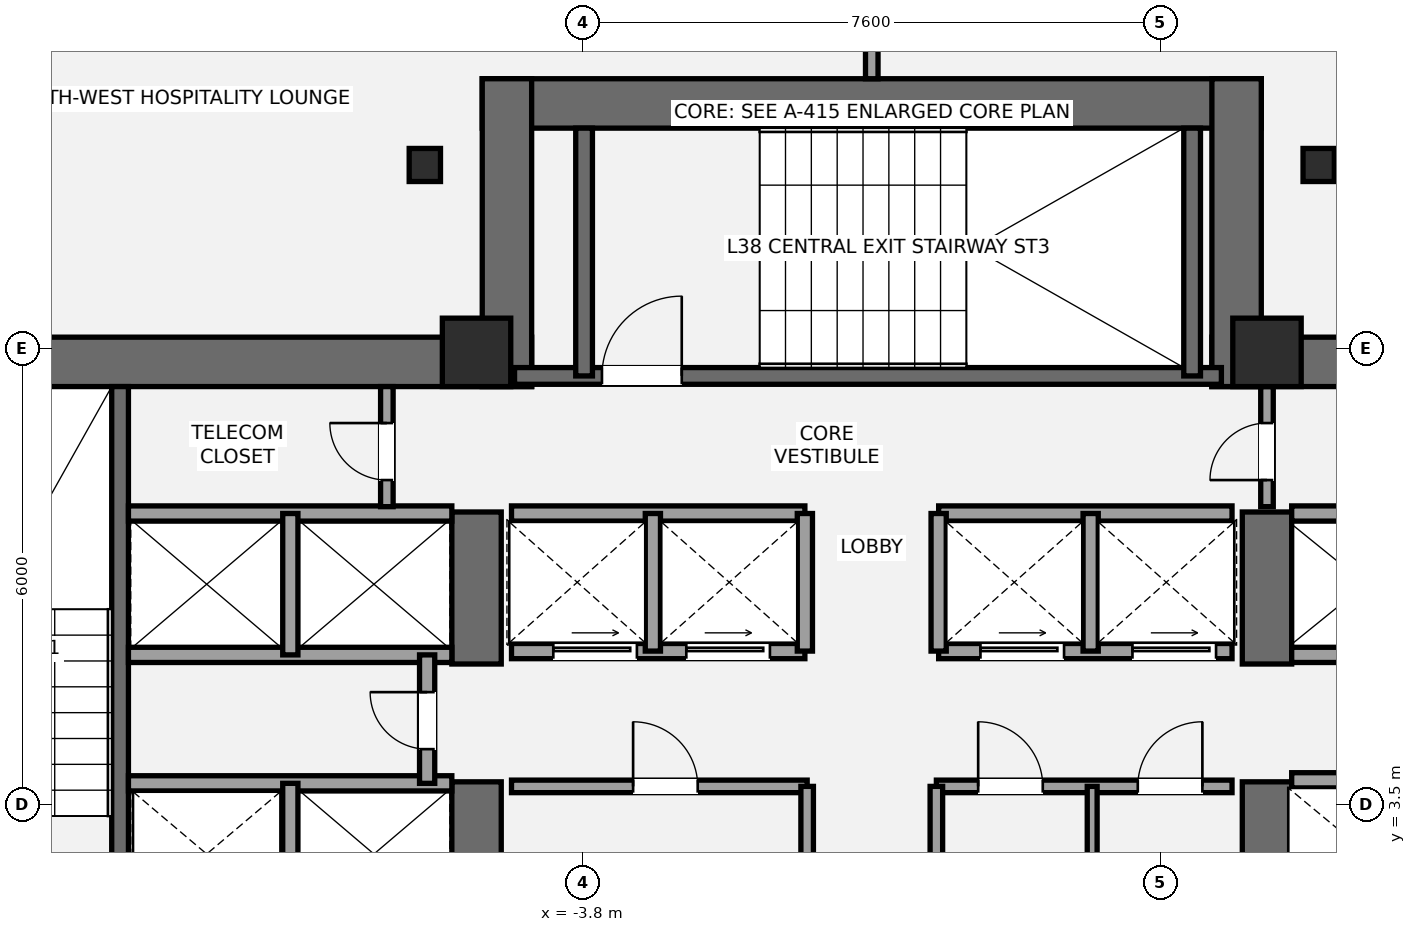
"""IFC4 building model, lengths in metres.
Left out: names, types, materials, properties, quantities, classifications, styles, units other than length and angle.
Written with IfcOpenShell. Run it as: python <this file> out.ifc"""

import sys

from ifc_helpers import new_model, si_unit, direction, frame, frame_2d, origin, origin_2d, place, context, subcontext, project, spatial, rectangle, i_section, extrude, element, fill, save


model = new_model("IFC4")
c1 = context("Model", 3, precision=1e-05, world=origin(), true_north=direction((0.0, 1.0)))
c2 = subcontext(c1, "Body", "Model", "MODEL_VIEW")
j1 = project(units=[si_unit("LENGTHUNIT", "METRE"), si_unit("PLANEANGLEUNIT", "RADIAN")], contexts=[c1])
p1 = place(None, origin())
s1 = spatial("IfcSite", under=j1, at=p1, CompositionType="ELEMENT")
p2 = place(p1, origin())
s2 = spatial("IfcBuilding", under=s1, at=p2, CompositionType="ELEMENT")
p3 = place(p2, frame((0.0, 0.0, 143.8)))
s3 = spatial("IfcBuildingStorey", under=s2, at=p3, CompositionType="ELEMENT", Elevation=143.8)
p4 = place(p3, frame((-13.8, 9.325, 0.0), z_axis=(0.0, 0.0, 1.0), x_axis=(1.0, 0.0, 0.0)))
e1 = element("IfcWall", 1, at=p4, inside=s3, PredefinedType="SHEAR", context=c2, shape_type="SweptSolid", body=[
    extrude(rectangle(XDim=9.325, YDim=0.65, at=frame_2d((4.663, 0.0))), origin(), (0.0, 0.0, 1.0), 3.2),
])
p5 = place(p3, frame((-5.2, 1.2, 0.0), z_axis=(0.0, 0.0, 1.0), x_axis=(0.0, 1.0, 0.0)))
e2 = element("IfcWall", 2, at=p5, inside=s3, PredefinedType="SHEAR", context=c2, shape_type="SweptSolid", body=[
    extrude(rectangle(XDim=2.6, YDim=0.65, at=frame_2d((1.3, 0.0))), origin(), (0.0, 0.0, 1.0), 3.2),
])
p6 = place(p3, frame((-5.2, 5.35, 0.0), z_axis=(0.0, 0.0, 1.0), x_axis=(0.0, 1.0, 0.0)))
e3 = element("IfcWall", 3, at=p6, inside=s3, PredefinedType="SHEAR", context=c2, shape_type="SweptSolid", body=[
    extrude(rectangle(XDim=2.0, YDim=0.65, at=frame_2d((1.0, 0.0))), origin(), (0.0, 0.0, 1.0), 3.2),
])
p7 = place(p3, frame((-9.89, 1.85, 0.0), z_axis=(0.0, 0.0, 1.0), x_axis=(0.0, 1.0, 0.0)))
e4 = element("IfcWall", 4, at=p7, inside=s3, PredefinedType="SHEAR", context=c2, shape_type="SweptSolid", body=[
    extrude(rectangle(XDim=7.15, YDim=0.22, at=frame_2d((3.575, 0.0))), origin(), (0.0, 0.0, 1.0), 3.2),
])
p8 = place(p3, frame((4.475, 9.325, 0.0), z_axis=(0.0, 0.0, 1.0), x_axis=(1.0, 0.0, 0.0)))
e5 = element("IfcWall", 5, at=p8, inside=s3, PredefinedType="SHEAR", context=c2, shape_type="SweptSolid", body=[
    extrude(rectangle(XDim=9.325, YDim=0.65, at=frame_2d((4.663, 0.0))), origin(), (0.0, 0.0, 1.0), 3.2),
])
p9 = place(p3, frame((5.2, 1.2, 0.0), z_axis=(0.0, 0.0, 1.0), x_axis=(0.0, 1.0, 0.0)))
e6 = element("IfcWall", 6, at=p9, inside=s3, PredefinedType="SHEAR", context=c2, shape_type="SweptSolid", body=[
    extrude(rectangle(XDim=2.6, YDim=0.65, at=frame_2d((1.3, 0.0))), origin(), (0.0, 0.0, 1.0), 3.2),
])
p10 = place(p3, frame((5.2, 5.35, 0.0), z_axis=(0.0, 0.0, 1.0), x_axis=(0.0, 1.0, 0.0)))
e7 = element("IfcWall", 7, at=p10, inside=s3, PredefinedType="SHEAR", context=c2, shape_type="SweptSolid", body=[
    extrude(rectangle(XDim=2.0, YDim=0.65, at=frame_2d((1.0, 0.0))), origin(), (0.0, 0.0, 1.0), 3.2),
])
p11 = place(p3, frame((-5.125, 12.725, 0.0), z_axis=(0.0, 0.0, 1.0), x_axis=(1.0, 0.0, 0.0)))
e8 = element("IfcWall", 8, at=p11, inside=s3, PredefinedType="SHEAR", context=c2, shape_type="SweptSolid", body=[
    extrude(rectangle(XDim=10.25, YDim=0.65, at=frame_2d((5.125, 0.0))), origin(), (0.0, 0.0, 1.0), 3.2),
])
for number, where, z_axis, x_axis in (
    (9, (-4.8, 9.0, 0.0), (0.0, 0.0, 1.0), (0.0, 1.0, 0.0)),
    (10, (4.8, 9.0, 0.0), (0.0, 0.0, 1.0), (0.0, 1.0, 0.0)),
):
    element("IfcWall", number, at=place(p3, frame(where, z_axis=z_axis, x_axis=x_axis)), inside=s3, PredefinedType="SHEAR", context=c2, shape_type="SweptSolid", body=[
        extrude(rectangle(XDim=4.05, YDim=0.65, at=frame_2d((2.025, 0.0))), origin(), (0.0, 0.0, 1.0), 3.2),
    ])
p12 = place(p3, frame((-4.7, 9.14, 0.0), z_axis=(0.0, 0.0, 1.0), x_axis=(1.0, 0.0, 0.0)))
e11 = element("IfcWall", 11, at=p12, inside=s3, PredefinedType="SHEAR", context=c2, shape_type="SweptSolid", body=[
    extrude(rectangle(XDim=9.3, YDim=0.22, at=frame_2d((4.65, 0.0))), origin(), (0.0, 0.0, 1.0), 3.2),
])
p13 = place(p12, frame((1.15, 0.0, 0.0)))
e12 = element("IfcOpeningElement", 12, at=p13, cuts=e11, PredefinedType="OPENING", context=c2, shape_type="SweptSolid", body=[
    extrude(rectangle(XDim=1.05, YDim=2.15, at=frame_2d((0.525, 1.075))), frame((0.0, 0.12, 0.0), z_axis=(0.0, -1.0, 0.0), x_axis=(1.0, 0.0, 0.0)), (0.0, 0.0, 1.0), 0.24),
])
for number, where, z_axis, x_axis in (
    (13, (-3.785, 9.14, 0.0), (0.0, 0.0, 1.0), (0.0, 1.0, 0.0)),
    (14, (4.215, 9.14, 0.0), (0.0, 0.0, 1.0), (0.0, 1.0, 0.0)),
):
    element("IfcWall", number, at=place(p3, frame(where, z_axis=z_axis, x_axis=x_axis)), inside=s3, PredefinedType="SHEAR", context=c2, shape_type="SweptSolid", body=[
        extrude(rectangle(XDim=3.26, YDim=0.22, at=frame_2d((1.63, 0.0))), origin(), (0.0, 0.0, 1.0), 3.2),
    ])
for number, where, z_axis, x_axis in (
    (15, (-5.2, 9.45, 0.0), (0.0, 0.0, 1.0), (1.0, 0.0, 0.0)),
    (16, (5.2, 9.45, 0.0), (0.0, 0.0, 1.0), (1.0, 0.0, 0.0)),
):
    element("IfcColumn", number, at=place(p3, frame(where, z_axis=z_axis, x_axis=x_axis)), inside=s3, PredefinedType="COLUMN", context=c2, shape_type="SweptSolid", body=[
        extrude(rectangle(XDim=0.9, YDim=0.9, at=origin_2d()), origin(), (0.0, 0.0, 1.0), 3.2),
    ])
for number, where, z_axis, x_axis in (
    (17, (5.88, 11.915, 0.0), (0.0, 0.0, 1.0), (1.0, 0.0, 0.0)),
    (18, (-5.88, 11.915, 0.0), (0.0, 0.0, 1.0), (1.0, 0.0, 0.0)),
):
    element("IfcColumn", number, at=place(p3, frame(where, z_axis=z_axis, x_axis=x_axis)), inside=s3, PredefinedType="COLUMN", context=c2, shape_type="SweptSolid", body=[
        extrude(i_section(OverallWidth=0.412, OverallDepth=0.435, WebThickness=0.036, FlangeThickness=0.057, at=origin_2d()), origin(), (0.0, 0.0, 1.0), 3.2),
    ])
p14 = place(p3, frame((-9.78, 3.78, 0.0), z_axis=(0.0, 0.0, 1.0), x_axis=(1.0, 0.0, 0.0)))
e19 = element("IfcWall", 19, at=p14, inside=s3, PredefinedType="SOLIDWALL", context=c2, shape_type="SweptSolid", body=[
    extrude(rectangle(XDim=4.255, YDim=0.2, at=frame_2d((2.127, 0.0))), origin(), (0.0, 0.0, 1.0), 3.02),
])
p15 = place(p3, frame((-7.65, 1.85, 0.0), z_axis=(0.0, 0.0, 1.0), x_axis=(0.0, 1.0, 0.0)))
e20 = element("IfcWall", 20, at=p15, inside=s3, PredefinedType="SOLIDWALL", context=c2, shape_type="SweptSolid", body=[
    extrude(rectangle(XDim=1.93, YDim=0.2, at=frame_2d((0.965, 0.0))), origin(), (0.0, 0.0, 1.0), 3.02),
])
for number, where, z_axis, x_axis in (
    (21, (-9.78, 5.47, 0.0), (0.0, 0.0, 1.0), (1.0, 0.0, 0.0)),
    (22, (-9.78, 7.33, 0.0), (0.0, 0.0, 1.0), (1.0, 0.0, 0.0)),
):
    element("IfcWall", number, at=place(p3, frame(where, z_axis=z_axis, x_axis=x_axis)), inside=s3, PredefinedType="SOLIDWALL", context=c2, shape_type="SweptSolid", body=[
        extrude(rectangle(XDim=4.255, YDim=0.2, at=frame_2d((2.127, 0.0))), origin(), (0.0, 0.0, 1.0), 3.02),
    ])
p16 = place(p3, frame((-7.65, 5.47, 0.0), z_axis=(0.0, 0.0, 1.0), x_axis=(0.0, 1.0, 0.0)))
e23 = element("IfcWall", 23, at=p16, inside=s3, PredefinedType="SOLIDWALL", context=c2, shape_type="SweptSolid", body=[
    extrude(rectangle(XDim=1.86, YDim=0.2, at=frame_2d((0.93, 0.0))), origin(), (0.0, 0.0, 1.0), 3.02),
])
p17 = place(p3, frame((-5.85, 3.78, 0.0), z_axis=(0.0, 0.0, 1.0), x_axis=(0.0, 1.0, 0.0)))
e24 = element("IfcWall", 24, at=p17, inside=s3, PredefinedType="SOLIDWALL", context=c2, shape_type="SweptSolid", body=[
    extrude(rectangle(XDim=1.69, YDim=0.2, at=frame_2d((0.845, 0.0))), origin(), (0.0, 0.0, 1.0), 3.02),
])
p18 = place(p17, frame((0.45, 0.0, 0.0)))
e25 = element("IfcOpeningElement", 25, at=p18, cuts=e24, PredefinedType="OPENING", context=c2, shape_type="SweptSolid", body=[
    extrude(rectangle(XDim=0.75, YDim=2.1, at=frame_2d((0.375, 1.05))), frame((0.0, 0.11, 0.0), z_axis=(0.0, -1.0, 0.0), x_axis=(1.0, 0.0, 0.0)), (0.0, 0.0, 1.0), 0.22),
])
p19 = place(p3, frame((5.525, 3.82, 0.0), z_axis=(0.0, 0.0, 1.0), x_axis=(1.0, 0.0, 0.0)))
e26 = element("IfcWall", 26, at=p19, inside=s3, PredefinedType="SOLIDWALL", context=c2, shape_type="SweptSolid", body=[
    extrude(rectangle(XDim=4.255, YDim=0.2, at=frame_2d((2.127, 0.0))), origin(), (0.0, 0.0, 1.0), 3.02),
])
p20 = place(p19, frame((0.65, 0.0, 0.0)))
e27 = element("IfcOpeningElement", 27, at=p20, cuts=e26, PredefinedType="OPENING", context=c2, shape_type="SweptSolid", body=[
    extrude(rectangle(XDim=1.2, YDim=2.2, at=frame_2d((0.6, 1.1))), frame((0.0, 0.11, 0.0), z_axis=(0.0, -1.0, 0.0), x_axis=(1.0, 0.0, 0.0)), (0.0, 0.0, 1.0), 0.22),
])
for number, where, z_axis, x_axis in (
    (28, (5.525, 5.47, 0.0), (0.0, 0.0, 1.0), (1.0, 0.0, 0.0)),
    (29, (5.525, 7.33, 0.0), (0.0, 0.0, 1.0), (1.0, 0.0, 0.0)),
):
    element("IfcWall", number, at=place(p3, frame(where, z_axis=z_axis, x_axis=x_axis)), inside=s3, PredefinedType="SOLIDWALL", context=c2, shape_type="SweptSolid", body=[
        extrude(rectangle(XDim=4.255, YDim=0.2, at=frame_2d((2.127, 0.0))), origin(), (0.0, 0.0, 1.0), 3.02),
    ])
p21 = place(p3, frame((-4.74, 3.74, 0.0), z_axis=(0.0, 0.0, 1.0), x_axis=(1.0, 0.0, 0.0)))
e30 = element("IfcWall", 30, at=p21, inside=s3, PredefinedType="PARTITIONING", context=c2, shape_type="SweptSolid", body=[
    extrude(rectangle(XDim=3.89, YDim=0.165, at=frame_2d((1.945, 0.0))), origin(), (0.0, 0.0, 1.0), 3.02),
])
p22 = place(p21, frame((1.6, 0.0, 0.0)))
e31 = element("IfcOpeningElement", 31, at=p22, cuts=e30, PredefinedType="OPENING", context=c2, shape_type="SweptSolid", body=[
    extrude(rectangle(XDim=0.85, YDim=2.1, at=frame_2d((0.425, 1.05))), frame((0.0, 0.093, 0.0), z_axis=(0.0, -1.0, 0.0), x_axis=(1.0, 0.0, 0.0)), (0.0, 0.0, 1.0), 0.185),
])
p23 = place(p3, frame((-0.85, 1.92, 0.0), z_axis=(0.0, 0.0, 1.0), x_axis=(0.0, 1.0, 0.0)))
e32 = element("IfcWall", 32, at=p23, inside=s3, PredefinedType="PARTITIONING", context=c2, shape_type="SweptSolid", body=[
    extrude(rectangle(XDim=1.82, YDim=0.165, at=frame_2d((0.91, 0.0))), origin(), (0.0, 0.0, 1.0), 3.02),
])
p24 = place(p3, frame((0.85, 3.74, 0.0), z_axis=(0.0, 0.0, 1.0), x_axis=(1.0, 0.0, 0.0)))
e33 = element("IfcWall", 33, at=p24, inside=s3, PredefinedType="PARTITIONING", context=c2, shape_type="SweptSolid", body=[
    extrude(rectangle(XDim=3.89, YDim=0.165, at=frame_2d((1.945, 0.0))), origin(), (0.0, 0.0, 1.0), 3.02),
])
p25 = place(p24, frame((0.55, 0.0, 0.0)))
e34 = element("IfcOpeningElement", 34, at=p25, cuts=e33, PredefinedType="OPENING", context=c2, shape_type="SweptSolid", body=[
    extrude(rectangle(XDim=0.85, YDim=2.1, at=frame_2d((0.425, 1.05))), frame((0.0, 0.093, 0.0), z_axis=(0.0, -1.0, 0.0), x_axis=(1.0, 0.0, 0.0)), (0.0, 0.0, 1.0), 0.185),
])
p26 = place(p24, frame((2.65, 0.0, 0.0)))
e35 = element("IfcOpeningElement", 35, at=p26, cuts=e33, PredefinedType="OPENING", context=c2, shape_type="SweptSolid", body=[
    extrude(rectangle(XDim=0.85, YDim=2.1, at=frame_2d((0.425, 1.05))), frame((0.0, 0.093, 0.0), z_axis=(0.0, -1.0, 0.0), x_axis=(1.0, 0.0, 0.0)), (0.0, 0.0, 1.0), 0.185),
])
p27 = place(p3, frame((0.85, 1.92, 0.0), z_axis=(0.0, 0.0, 1.0), x_axis=(0.0, 1.0, 0.0)))
e36 = element("IfcWall", 36, at=p27, inside=s3, PredefinedType="PARTITIONING", context=c2, shape_type="SweptSolid", body=[
    extrude(rectangle(XDim=1.82, YDim=0.165, at=frame_2d((0.91, 0.0))), origin(), (0.0, 0.0, 1.0), 3.02),
])
p28 = place(p3, frame((2.9, 1.92, 0.0), z_axis=(0.0, 0.0, 1.0), x_axis=(0.0, 1.0, 0.0)))
e37 = element("IfcWall", 37, at=p28, inside=s3, PredefinedType="PARTITIONING", context=c2, shape_type="SweptSolid", body=[
    extrude(rectangle(XDim=1.82, YDim=0.13, at=frame_2d((0.91, 0.0))), origin(), (0.0, 0.0, 1.0), 3.02),
])
p29 = place(p3, frame((-4.74, 5.52, 0.0), z_axis=(0.0, 0.0, 1.0), x_axis=(1.0, 0.0, 0.0)))
e38 = element("IfcWall", 38, at=p29, inside=s3, PredefinedType="SOLIDWALL", context=c2, shape_type="SweptSolid", body=[
    extrude(rectangle(XDim=3.86, YDim=0.2, at=frame_2d((1.93, 0.0))), origin(), (0.0, 0.0, 1.0), 3.02),
])
p30 = place(p29, frame((0.55, 0.0, 0.0)))
e39 = element("IfcOpeningElement", 39, at=p30, cuts=e38, PredefinedType="OPENING", context=c2, shape_type="SweptSolid", body=[
    extrude(rectangle(XDim=1.1, YDim=2.2, at=frame_2d((0.55, 1.1))), frame((0.0, 0.11, 0.0), z_axis=(0.0, -1.0, 0.0), x_axis=(1.0, 0.0, 0.0)), (0.0, 0.0, 1.0), 0.22),
])
p31 = place(p29, frame((2.3, 0.0, 0.0)))
e40 = element("IfcOpeningElement", 40, at=p31, cuts=e38, PredefinedType="OPENING", context=c2, shape_type="SweptSolid", body=[
    extrude(rectangle(XDim=1.1, YDim=2.2, at=frame_2d((0.55, 1.1))), frame((0.0, 0.11, 0.0), z_axis=(0.0, -1.0, 0.0), x_axis=(1.0, 0.0, 0.0)), (0.0, 0.0, 1.0), 0.22),
])
p32 = place(p3, frame((0.88, 5.52, 0.0), z_axis=(0.0, 0.0, 1.0), x_axis=(1.0, 0.0, 0.0)))
e41 = element("IfcWall", 41, at=p32, inside=s3, PredefinedType="SOLIDWALL", context=c2, shape_type="SweptSolid", body=[
    extrude(rectangle(XDim=3.86, YDim=0.2, at=frame_2d((1.93, 0.0))), origin(), (0.0, 0.0, 1.0), 3.02),
])
p33 = place(p32, frame((0.55, 0.0, 0.0)))
e42 = element("IfcOpeningElement", 42, at=p33, cuts=e41, PredefinedType="OPENING", context=c2, shape_type="SweptSolid", body=[
    extrude(rectangle(XDim=1.1, YDim=2.2, at=frame_2d((0.55, 1.1))), frame((0.0, 0.11, 0.0), z_axis=(0.0, -1.0, 0.0), x_axis=(1.0, 0.0, 0.0)), (0.0, 0.0, 1.0), 0.22),
])
p34 = place(p32, frame((2.55, 0.0, 0.0)))
e43 = element("IfcOpeningElement", 43, at=p34, cuts=e41, PredefinedType="OPENING", context=c2, shape_type="SweptSolid", body=[
    extrude(rectangle(XDim=1.1, YDim=2.2, at=frame_2d((0.55, 1.1))), frame((0.0, 0.11, 0.0), z_axis=(0.0, -1.0, 0.0), x_axis=(1.0, 0.0, 0.0)), (0.0, 0.0, 1.0), 0.22),
])
for number, where, z_axis, x_axis in (
    (44, (-4.74, 7.33, 0.0), (0.0, 0.0, 1.0), (1.0, 0.0, 0.0)),
    (45, (0.88, 7.33, 0.0), (0.0, 0.0, 1.0), (1.0, 0.0, 0.0)),
):
    element("IfcWall", number, at=place(p3, frame(where, z_axis=z_axis, x_axis=x_axis)), inside=s3, PredefinedType="SOLIDWALL", context=c2, shape_type="SweptSolid", body=[
        extrude(rectangle(XDim=3.86, YDim=0.2, at=frame_2d((1.93, 0.0))), origin(), (0.0, 0.0, 1.0), 3.02),
    ])
for number, where, z_axis, x_axis in (
    (46, (-2.88, 5.52, 0.0), (0.0, 0.0, 1.0), (0.0, 1.0, 0.0)),
    (47, (2.88, 5.52, 0.0), (0.0, 0.0, 1.0), (0.0, 1.0, 0.0)),
    (48, (-0.88, 5.52, 0.0), (0.0, 0.0, 1.0), (0.0, 1.0, 0.0)),
    (49, (0.88, 5.52, 0.0), (0.0, 0.0, 1.0), (0.0, 1.0, 0.0)),
):
    element("IfcWall", number, at=place(p3, frame(where, z_axis=z_axis, x_axis=x_axis)), inside=s3, PredefinedType="SOLIDWALL", context=c2, shape_type="SweptSolid", body=[
        extrude(rectangle(XDim=1.81, YDim=0.2, at=frame_2d((0.905, 0.0))), origin(), (0.0, 0.0, 1.0), 3.02),
    ])
p35 = place(p3, frame((-6.38, 7.42, 0.0), z_axis=(0.0, 0.0, 1.0), x_axis=(0.0, 1.0, 0.0)))
e50 = element("IfcWall", 50, at=p35, inside=s3, PredefinedType="PARTITIONING", context=c2, shape_type="SweptSolid", body=[
    extrude(rectangle(XDim=1.58, YDim=0.165, at=frame_2d((0.79, 0.0))), origin(), (0.0, 0.0, 1.0), 3.02),
])
p36 = place(p35, frame((0.35, 0.0, 0.0)))
e51 = element("IfcOpeningElement", 51, at=p36, cuts=e50, PredefinedType="OPENING", context=c2, shape_type="SweptSolid", body=[
    extrude(rectangle(XDim=0.75, YDim=2.1, at=frame_2d((0.375, 1.05))), frame((0.0, 0.093, 0.0), z_axis=(0.0, -1.0, 0.0), x_axis=(1.0, 0.0, 0.0)), (0.0, 0.0, 1.0), 0.185),
])
p37 = place(p3, frame((5.2, 7.42, 0.0), z_axis=(0.0, 0.0, 1.0), x_axis=(0.0, 1.0, 0.0)))
e52 = element("IfcWall", 52, at=p37, inside=s3, PredefinedType="PARTITIONING", context=c2, shape_type="SweptSolid", body=[
    extrude(rectangle(XDim=1.58, YDim=0.165, at=frame_2d((0.79, 0.0))), origin(), (0.0, 0.0, 1.0), 3.02),
])
p38 = place(p37, frame((0.35, 0.0, 0.0)))
e53 = element("IfcOpeningElement", 53, at=p38, cuts=e52, PredefinedType="OPENING", context=c2, shape_type="SweptSolid", body=[
    extrude(rectangle(XDim=0.75, YDim=2.1, at=frame_2d((0.375, 1.05))), frame((0.0, 0.093, 0.0), z_axis=(0.0, -1.0, 0.0), x_axis=(1.0, 0.0, 0.0)), (0.0, 0.0, 1.0), 0.185),
])
p39 = place(p3, frame((0.0, 13.05, 0.0), z_axis=(0.0, 0.0, 1.0), x_axis=(0.0, 1.0, 0.0)))
e54 = element("IfcWall", 54, at=p39, inside=s3, PredefinedType="PARTITIONING", context=c2, shape_type="SweptSolid", body=[
    extrude(rectangle(XDim=3.198, YDim=0.165, at=frame_2d((1.599, 0.0))), origin(), (0.0, 0.0, 1.0), 3.02),
])
p40 = place(p13, origin())
e55 = element("IfcDoor", 55, at=p40, inside=s3, OperationType="SINGLE_SWING_RIGHT", PredefinedType="DOOR", context=c2, shape_type="SweptSolid", body=[
    extrude(rectangle(XDim=1.05, YDim=2.15, at=frame_2d((0.525, 1.075))), frame((0.0, 0.025, 0.0), z_axis=(0.0, -1.0, 0.0), x_axis=(1.0, 0.0, 0.0)), (0.0, 0.0, 1.0), 0.05),
])
fill(e12, e55)
p41 = place(p18, origin())
e56 = element("IfcDoor", 56, at=p41, inside=s3, OperationType="SINGLE_SWING_RIGHT", PredefinedType="DOOR", context=c2, shape_type="SweptSolid", body=[
    extrude(rectangle(XDim=0.75, YDim=2.1, at=frame_2d((0.375, 1.05))), frame((0.0, 0.025, 0.0), z_axis=(0.0, -1.0, 0.0), x_axis=(1.0, 0.0, 0.0)), (0.0, 0.0, 1.0), 0.05),
])
fill(e25, e56)
p42 = place(p22, origin())
e57 = element("IfcDoor", 57, at=p42, inside=s3, OperationType="SINGLE_SWING_LEFT", PredefinedType="DOOR", context=c2, shape_type="SweptSolid", body=[
    extrude(rectangle(XDim=0.85, YDim=2.1, at=frame_2d((0.425, 1.05))), frame((0.0, 0.025, 0.0), z_axis=(0.0, -1.0, 0.0), x_axis=(1.0, 0.0, 0.0)), (0.0, 0.0, 1.0), 0.05),
])
fill(e31, e57)
p43 = place(p25, origin())
e58 = element("IfcDoor", 58, at=p43, inside=s3, OperationType="SINGLE_SWING_LEFT", PredefinedType="DOOR", context=c2, shape_type="SweptSolid", body=[
    extrude(rectangle(XDim=0.85, YDim=2.1, at=frame_2d((0.425, 1.05))), frame((0.0, 0.025, 0.0), z_axis=(0.0, -1.0, 0.0), x_axis=(1.0, 0.0, 0.0)), (0.0, 0.0, 1.0), 0.05),
])
fill(e34, e58)
p44 = place(p26, origin())
e59 = element("IfcDoor", 59, at=p44, inside=s3, OperationType="SINGLE_SWING_RIGHT", PredefinedType="DOOR", context=c2, shape_type="SweptSolid", body=[
    extrude(rectangle(XDim=0.85, YDim=2.1, at=frame_2d((0.425, 1.05))), frame((0.0, 0.025, 0.0), z_axis=(0.0, -1.0, 0.0), x_axis=(1.0, 0.0, 0.0)), (0.0, 0.0, 1.0), 0.05),
])
fill(e35, e59)
p45 = place(p30, origin())
e60 = element("IfcDoor", 60, at=p45, inside=s3, OperationType="SLIDING_TO_LEFT", PredefinedType="DOOR", context=c2, shape_type="SweptSolid", body=[
    extrude(rectangle(XDim=1.1, YDim=2.2, at=frame_2d((0.55, 1.1))), frame((0.0, 0.025, 0.0), z_axis=(0.0, -1.0, 0.0), x_axis=(1.0, 0.0, 0.0)), (0.0, 0.0, 1.0), 0.05),
])
fill(e39, e60)
p46 = place(p31, origin())
e61 = element("IfcDoor", 61, at=p46, inside=s3, OperationType="SLIDING_TO_LEFT", PredefinedType="DOOR", context=c2, shape_type="SweptSolid", body=[
    extrude(rectangle(XDim=1.1, YDim=2.2, at=frame_2d((0.55, 1.1))), frame((0.0, 0.025, 0.0), z_axis=(0.0, -1.0, 0.0), x_axis=(1.0, 0.0, 0.0)), (0.0, 0.0, 1.0), 0.05),
])
fill(e40, e61)
p47 = place(p33, origin())
e62 = element("IfcDoor", 62, at=p47, inside=s3, OperationType="SLIDING_TO_LEFT", PredefinedType="DOOR", context=c2, shape_type="SweptSolid", body=[
    extrude(rectangle(XDim=1.1, YDim=2.2, at=frame_2d((0.55, 1.1))), frame((0.0, 0.025, 0.0), z_axis=(0.0, -1.0, 0.0), x_axis=(1.0, 0.0, 0.0)), (0.0, 0.0, 1.0), 0.05),
])
fill(e42, e62)
p48 = place(p34, origin())
e63 = element("IfcDoor", 63, at=p48, inside=s3, OperationType="SLIDING_TO_LEFT", PredefinedType="DOOR", context=c2, shape_type="SweptSolid", body=[
    extrude(rectangle(XDim=1.1, YDim=2.2, at=frame_2d((0.55, 1.1))), frame((0.0, 0.025, 0.0), z_axis=(0.0, -1.0, 0.0), x_axis=(1.0, 0.0, 0.0)), (0.0, 0.0, 1.0), 0.05),
])
fill(e43, e63)
p49 = place(p36, origin())
e64 = element("IfcDoor", 64, at=p49, inside=s3, OperationType="SINGLE_SWING_RIGHT", PredefinedType="DOOR", context=c2, shape_type="SweptSolid", body=[
    extrude(rectangle(XDim=0.75, YDim=2.1, at=frame_2d((0.375, 1.05))), frame((0.0, 0.025, 0.0), z_axis=(0.0, -1.0, 0.0), x_axis=(1.0, 0.0, 0.0)), (0.0, 0.0, 1.0), 0.05),
])
fill(e51, e64)
p50 = place(p38, origin())
e65 = element("IfcDoor", 65, at=p50, inside=s3, OperationType="SINGLE_SWING_LEFT", PredefinedType="DOOR", context=c2, shape_type="SweptSolid", body=[
    extrude(rectangle(XDim=0.75, YDim=2.1, at=frame_2d((0.375, 1.05))), frame((0.0, 0.025, 0.0), z_axis=(0.0, -1.0, 0.0), x_axis=(1.0, 0.0, 0.0)), (0.0, 0.0, 1.0), 0.05),
])
fill(e53, e65)
save(model, sys.argv[1])
